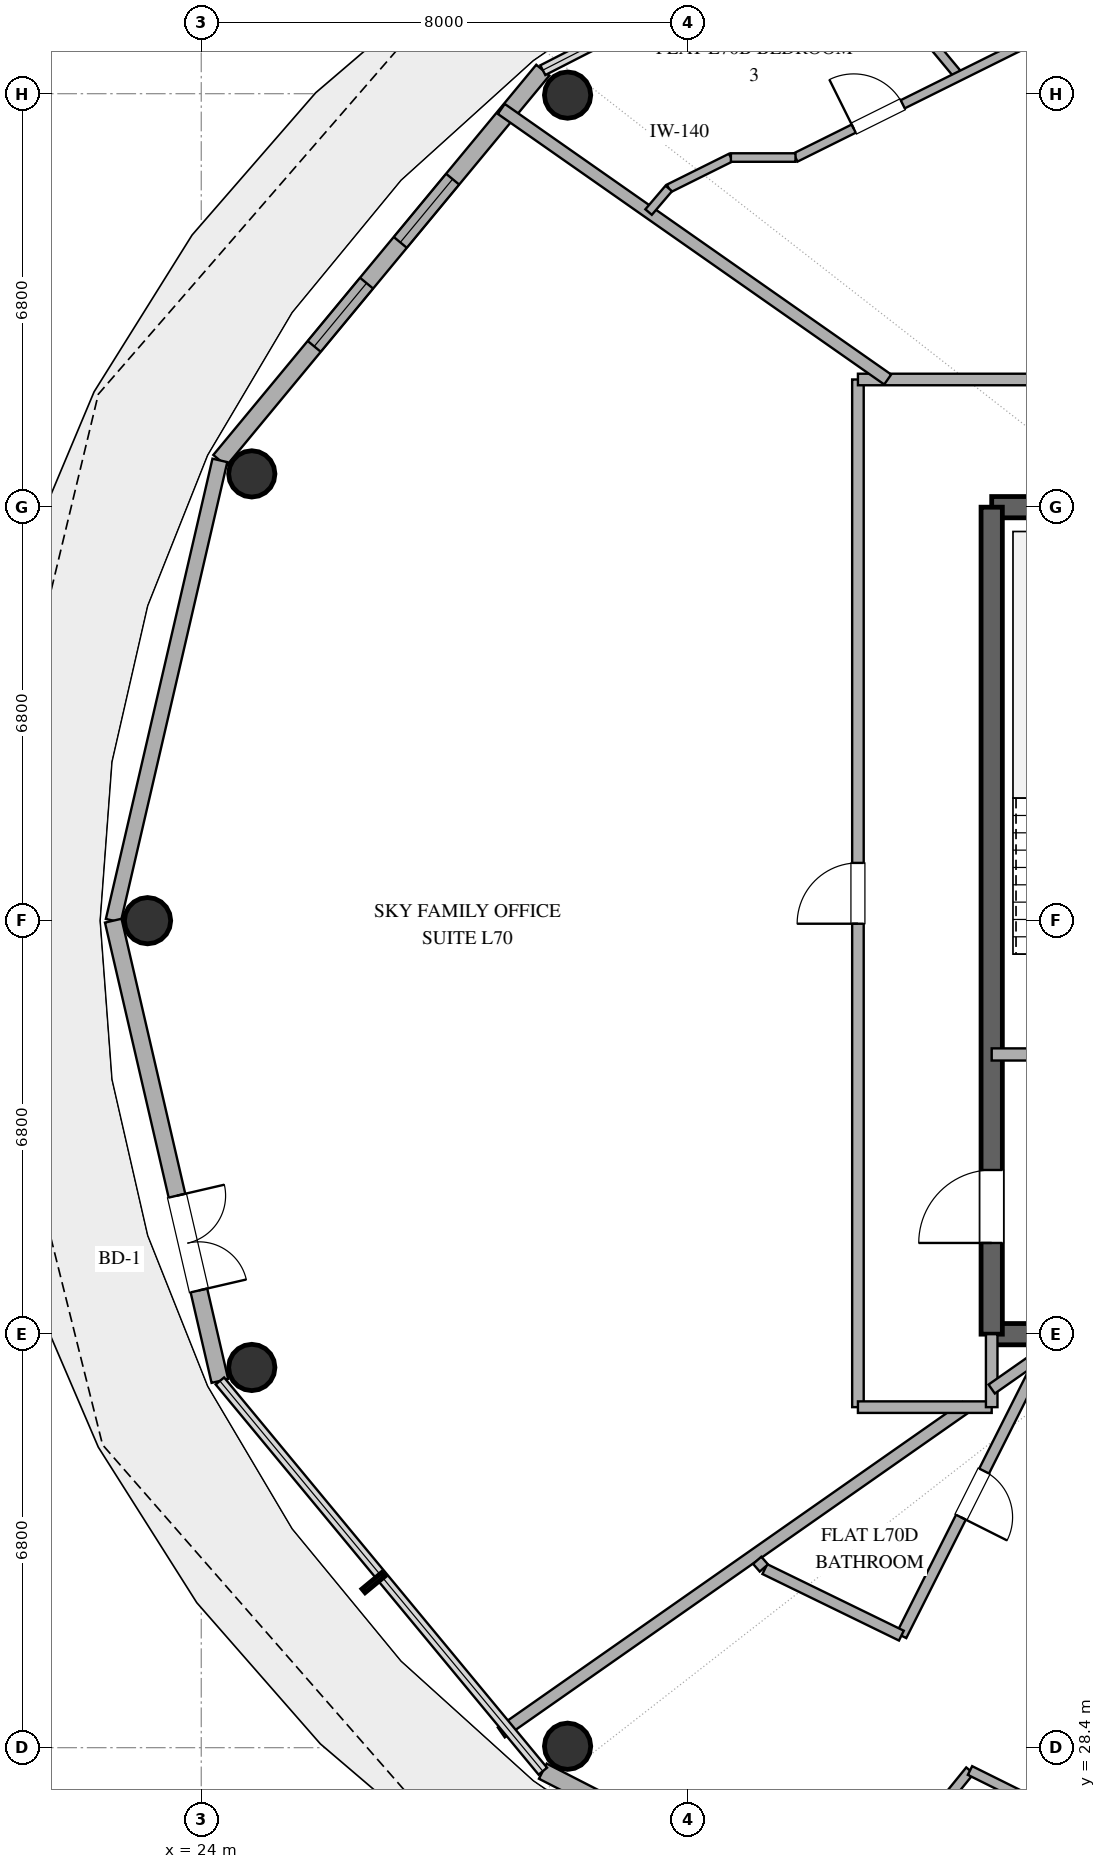
"""IFC4 building model, lengths in metres.
Left out: names, types, materials, properties, quantities, classifications, styles, units other than length and angle.
Written with IfcOpenShell. Run it as: python <this file> out.ifc"""

import sys

from ifc_helpers import new_model, si_unit, direction, frame, frame_2d, origin, origin_2d, place, context, subcontext, project, spatial, rectangle, hollow_circle, extrude, element, fill, save


model = new_model("IFC4")
c1 = context("Model", 3, precision=1e-05, world=origin(), true_north=direction((0.0, 1.0)))
c2 = subcontext(c1, "Body", "Model", "MODEL_VIEW")
j1 = project(units=[si_unit("LENGTHUNIT", "METRE"), si_unit("PLANEANGLEUNIT", "RADIAN")], contexts=[c1])
p1 = place(None, origin())
s1 = spatial("IfcSite", under=j1, at=p1, CompositionType="ELEMENT")
p2 = place(p1, origin())
s2 = spatial("IfcBuilding", under=s1, at=p2, CompositionType="ELEMENT")
p3 = place(p2, frame((0.0, 0.0, 273.0)))
s3 = spatial("IfcBuildingStorey", under=s2, at=p3, CompositionType="ELEMENT", Elevation=273.0)
for number, where, z_axis, x_axis in (
    (1, (37.0, 35.2, 0.0), (0.0, 0.0, 1.0), (1.0, 0.0, 0.0)),
    (2, (37.0, 48.8, 0.0), (0.0, 0.0, 1.0), (1.0, 0.0, 0.0)),
):
    element("IfcWall", number, at=place(p3, frame(where, z_axis=z_axis, x_axis=x_axis)), inside=s3, PredefinedType="SHEAR", context=c2, shape_type="SweptSolid", body=[
        extrude(rectangle(XDim=4.0, YDim=0.35, at=frame_2d((2.0, 0.0))), origin(), (0.0, 0.0, 1.0), 3.37),
    ])
p4 = place(p3, frame((37.0, 35.2, 0.0), z_axis=(0.0, 0.0, 1.0), x_axis=(0.0, 1.0, 0.0)))
e3 = element("IfcWall", 3, at=p4, inside=s3, PredefinedType="SHEAR", context=c2, shape_type="SweptSolid", body=[
    extrude(rectangle(XDim=13.6, YDim=0.35, at=frame_2d((6.8, 0.0))), origin(), (0.0, 0.0, 1.0), 3.37),
])
p5 = place(p4, frame((1.5, 0.0, 0.0)))
e4 = element("IfcOpeningElement", 4, at=p5, cuts=e3, PredefinedType="OPENING", context=c2, shape_type="SweptSolid", body=[
    extrude(rectangle(XDim=1.2, YDim=2.15, at=frame_2d((0.6, 1.075))), frame((0.0, 0.185, 0.0), z_axis=(0.0, -1.0, 0.0), x_axis=(1.0, 0.0, 0.0)), (0.0, 0.0, 1.0), 0.37),
])
for number, where, z_axis, x_axis in (
    (5, (30.025, 55.576, 0.0), (0.0, 0.0, 1.0), (1.0, 0.0, 0.0)),
    (6, (24.831, 49.347, 0.0), (0.0, 0.0, 1.0), (1.0, 0.0, 0.0)),
    (7, (23.117, 42.0, 0.0), (0.0, 0.0, 1.0), (1.0, 0.0, 0.0)),
    (8, (24.831, 34.653, 0.0), (0.0, 0.0, 1.0), (1.0, 0.0, 0.0)),
    (9, (30.025, 28.424, 0.0), (0.0, 0.0, 1.0), (1.0, 0.0, 0.0)),
):
    element("IfcColumn", number, at=place(p3, frame(where, z_axis=z_axis, x_axis=x_axis)), inside=s3, PredefinedType="COLUMN", context=c2, shape_type="SweptSolid", body=[
        extrude(hollow_circle(Radius=0.381, WallThickness=0.025, at=origin_2d()), origin(), (0.0, 0.0, 1.0), 3.37),
    ])
p6 = place(p3, frame((29.617, 55.987, 0.0), z_axis=(0.0, 0.0, 1.0), x_axis=(-0.63761509934, -0.770355103243, 0.0)))
e10 = element("IfcWall", 10, at=p6, inside=s3, PredefinedType="SOLIDWALL", context=c2, shape_type="SweptSolid", body=[
    extrude(rectangle(XDim=8.33, YDim=0.28, at=frame_2d((4.165, 0.0))), origin(), (0.0, 0.0, 1.0), 3.37),
])
p7 = place(p6, frame((2.326, 0.0, 0.85)))
e11 = element("IfcOpeningElement", 11, at=p7, cuts=e10, PredefinedType="OPENING", context=c2, shape_type="SweptSolid", body=[
    extrude(rectangle(XDim=1.35, YDim=1.8, at=frame_2d((0.675, 0.9))), frame((0.0, 0.15, 0.0), z_axis=(0.0, -1.0, 0.0), x_axis=(1.0, 0.0, 0.0)), (0.0, 0.0, 1.0), 0.3),
])
p8 = place(p6, frame((4.546, 0.0, 0.85)))
e12 = element("IfcOpeningElement", 12, at=p8, cuts=e10, PredefinedType="OPENING", context=c2, shape_type="SweptSolid", body=[
    extrude(rectangle(XDim=1.35, YDim=1.8, at=frame_2d((0.675, 0.9))), frame((0.0, 0.15, 0.0), z_axis=(0.0, -1.0, 0.0), x_axis=(1.0, 0.0, 0.0)), (0.0, 0.0, 1.0), 0.3),
])
p9 = place(p3, frame((24.306, 49.57, 0.0), z_axis=(0.0, 0.0, 1.0), x_axis=(-0.225635078214, -0.974211892495, 0.0)))
e13 = element("IfcWall", 13, at=p9, inside=s3, PredefinedType="SOLIDWALL", context=c2, shape_type="SweptSolid", body=[
    extrude(rectangle(XDim=7.77, YDim=0.25, at=frame_2d((3.885, 0.0))), origin(), (0.0, 0.0, 1.0), 3.37),
])
p10 = place(p3, frame((22.553, 42.0, 0.0), z_axis=(0.0, 0.0, 1.0), x_axis=(0.225635078214, -0.974211892495, 0.0)))
e14 = element("IfcWall", 14, at=p10, inside=s3, PredefinedType="SOLIDWALL", context=c2, shape_type="SweptSolid", body=[
    extrude(rectangle(XDim=7.77, YDim=0.28, at=frame_2d((3.885, 0.0))), origin(), (0.0, 0.0, 1.0), 3.37),
])
p11 = place(p10, frame((4.642, 0.0, 0.0)))
e15 = element("IfcOpeningElement", 15, at=p11, cuts=e14, PredefinedType="OPENING", context=c2, shape_type="SweptSolid", body=[
    extrude(rectangle(XDim=1.6, YDim=2.25, at=frame_2d((0.8, 1.125))), frame((0.0, 0.15, 0.0), z_axis=(0.0, -1.0, 0.0), x_axis=(1.0, 0.0, 0.0)), (0.0, 0.0, 1.0), 0.3),
])
p12 = place(p3, frame((29.617, 28.013, 0.0), z_axis=(0.0, 0.0, 1.0), x_axis=(0.890007394051, -0.455946091699, 0.0)))
e16 = element("IfcWall", 16, at=p12, inside=s3, PredefinedType="SOLIDWALL", context=c2, shape_type="SweptSolid", body=[
    extrude(rectangle(XDim=9.404, YDim=0.28, at=frame_2d((4.702, 0.0))), origin(), (0.0, 0.0, 1.0), 3.37),
])
p13 = place(p12, frame((2.533, 0.0, 0.85)))
e17 = element("IfcOpeningElement", 17, at=p13, cuts=e16, PredefinedType="OPENING", context=c2, shape_type="SweptSolid", body=[
    extrude(rectangle(XDim=1.8, YDim=2.2, at=frame_2d((0.9, 1.1))), frame((0.0, 0.15, 0.0), z_axis=(0.0, -1.0, 0.0), x_axis=(1.0, 0.0, 0.0)), (0.0, 0.0, 1.0), 0.3),
])
p14 = place(p12, frame((6.049, 0.0, 0.85)))
e18 = element("IfcOpeningElement", 18, at=p14, cuts=e16, PredefinedType="OPENING", context=c2, shape_type="SweptSolid", body=[
    extrude(rectangle(XDim=1.65, YDim=2.0, at=frame_2d((0.825, 1.0))), frame((0.0, 0.15, 0.0), z_axis=(0.0, -1.0, 0.0), x_axis=(1.0, 0.0, 0.0)), (0.0, 0.0, 1.0), 0.3),
])
p15 = place(p3, frame((37.0, 39.8, 0.0), z_axis=(0.0, 0.0, 1.0), x_axis=(1.0, 0.0, 0.0)))
e19 = element("IfcWall", 19, at=p15, inside=s3, PredefinedType="SOLIDWALL", context=c2, shape_type="SweptSolid", body=[
    extrude(rectangle(XDim=4.0, YDim=0.2, at=frame_2d((2.0, 0.0))), origin(), (0.0, 0.0, 1.0), 2.73),
])
p16 = place(p15, frame((1.45, 0.0, 0.0)))
e20 = element("IfcOpeningElement", 20, at=p16, cuts=e19, PredefinedType="OPENING", context=c2, shape_type="SweptSolid", body=[
    extrude(rectangle(XDim=1.1, YDim=2.15, at=frame_2d((0.55, 1.075))), frame((0.0, 0.11, 0.0), z_axis=(0.0, -1.0, 0.0), x_axis=(1.0, 0.0, 0.0)), (0.0, 0.0, 1.0), 0.22),
])
p17 = place(p3, frame((34.8, 34.0, 0.0), z_axis=(0.0, 0.0, 1.0), x_axis=(0.0, 1.0, 0.0)))
e21 = element("IfcWall", 21, at=p17, inside=s3, PredefinedType="PARTITIONING", context=c2, shape_type="SweptSolid", body=[
    extrude(rectangle(XDim=16.9, YDim=0.19, at=frame_2d((8.45, 0.0))), origin(), (0.0, 0.0, 1.0), 2.73),
])
p18 = place(p17, frame((7.95, 0.0, 0.0)))
e22 = element("IfcOpeningElement", 22, at=p18, cuts=e21, PredefinedType="OPENING", context=c2, shape_type="SweptSolid", body=[
    extrude(rectangle(XDim=1.0, YDim=2.2, at=frame_2d((0.5, 1.1))), frame((0.0, 0.105, 0.0), z_axis=(0.0, -1.0, 0.0), x_axis=(1.0, 0.0, 0.0)), (0.0, 0.0, 1.0), 0.21),
])
p19 = place(p3, frame((34.8, 50.9, 0.0), z_axis=(0.0, 0.0, 1.0), x_axis=(1.0, 0.0, 0.0)))
e23 = element("IfcWall", 23, at=p19, inside=s3, PredefinedType="PARTITIONING", context=c2, shape_type="SweptSolid", body=[
    extrude(rectangle(XDim=15.618, YDim=0.19, at=frame_2d((7.809, 0.0))), origin(), (0.0, 0.0, 1.0), 2.73),
])
p20 = place(p19, frame((6.848, 0.0, 0.0)))
e24 = element("IfcOpeningElement", 24, at=p20, cuts=e23, PredefinedType="OPENING", context=c2, shape_type="SweptSolid", body=[
    extrude(rectangle(XDim=1.0, YDim=2.2, at=frame_2d((0.5, 1.1))), frame((0.0, 0.105, 0.0), z_axis=(0.0, -1.0, 0.0), x_axis=(1.0, 0.0, 0.0)), (0.0, 0.0, 1.0), 0.21),
])
p21 = place(p3, frame((37.855, 34.896, 0.0), z_axis=(0.0, 0.0, 1.0), x_axis=(-0.449274589412, -0.893393722447, 0.0)))
e25 = element("IfcWall", 25, at=p21, inside=s3, PredefinedType="PLUMBINGWALL", context=c2, shape_type="SweptSolid", body=[
    extrude(rectangle(XDim=5.209, YDim=0.18, at=frame_2d((2.604, 0.0))), origin(), (0.0, 0.0, 1.0), 2.73),
])
p22 = place(p21, frame((2.18, 0.0, 0.0)))
e26 = element("IfcOpeningElement", 26, at=p22, cuts=e25, PredefinedType="OPENING", context=c2, shape_type="SweptSolid", body=[
    extrude(rectangle(XDim=0.85, YDim=2.1, at=frame_2d((0.425, 1.05))), frame((0.0, 0.1, 0.0), z_axis=(0.0, -1.0, 0.0), x_axis=(1.0, 0.0, 0.0)), (0.0, 0.0, 1.0), 0.2),
])
p23 = place(p3, frame((36.575, 34.0, 0.0), z_axis=(0.0, 0.0, 1.0), x_axis=(-0.819138444565, -0.57359585828, 0.0)))
e27 = element("IfcWall", 27, at=p23, inside=s3, PredefinedType="PARTITIONING", context=c2, shape_type="SweptSolid", body=[
    extrude(rectangle(XDim=9.326, YDim=0.2, at=frame_2d((4.663, 0.0))), origin(), (0.0, 0.0, 1.0), 2.73),
])
p24 = place(p3, frame((35.29, 50.9, 0.0), z_axis=(0.0, 0.0, 1.0), x_axis=(-0.819162424527, 0.573561611549, 0.0)))
e28 = element("IfcWall", 28, at=p24, inside=s3, PredefinedType="PARTITIONING", context=c2, shape_type="SweptSolid", body=[
    extrude(rectangle(XDim=7.758, YDim=0.2, at=frame_2d((3.879, 0.0))), origin(), (0.0, 0.0, 1.0), 2.73),
])
p25 = place(p3, frame((36.465, 55.887, 0.0), z_axis=(0.0, 0.0, 1.0), x_axis=(-0.638979285107, 0.769223942168, 0.0)))
e29 = element("IfcWall", 29, at=p25, inside=s3, PredefinedType="PARTITIONING", context=c2, shape_type="SweptSolid", body=[
    extrude(rectangle(XDim=3.41, YDim=0.15, at=frame_2d((1.705, 0.0))), origin(), (0.0, 0.0, 1.0), 2.73),
])
p26 = place(p3, frame((36.643, 28.024, 0.0), z_axis=(0.0, 0.0, 1.0), x_axis=(-0.630641219738, -0.776074514442, 0.0)))
e30 = element("IfcWall", 30, at=p26, inside=s3, PredefinedType="PLUMBINGWALL", context=c2, shape_type="SweptSolid", body=[
    extrude(rectangle(XDim=3.405, YDim=0.16, at=frame_2d((1.702, 0.0))), origin(), (0.0, 0.0, 1.0), 2.73),
])
p27 = place(p26, frame((1.192, 0.0, 0.0)))
e31 = element("IfcOpeningElement", 31, at=p27, cuts=e30, PredefinedType="OPENING", context=c2, shape_type="SweptSolid", body=[
    extrude(rectangle(XDim=0.9, YDim=2.1, at=frame_2d((0.45, 1.05))), frame((0.0, 0.09, 0.0), z_axis=(0.0, -1.0, 0.0), x_axis=(1.0, 0.0, 0.0)), (0.0, 0.0, 1.0), 0.18),
])
p28 = place(p3, frame((33.773, 54.55, 0.0), z_axis=(0.0, 0.0, 1.0), x_axis=(0.895593510097, 0.44487331306, 0.0)))
e32 = element("IfcWall", 32, at=p28, inside=s3, PredefinedType="PARTITIONING", context=c2, shape_type="SweptSolid", body=[
    extrude(rectangle(XDim=6.222, YDim=0.15, at=frame_2d((3.111, 0.0))), origin(), (0.0, 0.0, 1.0), 2.73),
])
p29 = place(p28, frame((4.147, 0.0, 0.0)))
e33 = element("IfcOpeningElement", 33, at=p29, cuts=e32, PredefinedType="OPENING", context=c2, shape_type="SweptSolid", body=[
    extrude(rectangle(XDim=0.9, YDim=2.1, at=frame_2d((0.45, 1.05))), frame((0.0, 0.085, 0.0), z_axis=(0.0, -1.0, 0.0), x_axis=(1.0, 0.0, 0.0)), (0.0, 0.0, 1.0), 0.17),
])
p30 = place(p28, frame((1.069, 0.0, 0.0)))
e34 = element("IfcOpeningElement", 34, at=p30, cuts=e32, PredefinedType="OPENING", context=c2, shape_type="SweptSolid", body=[
    extrude(rectangle(XDim=0.9, YDim=2.1, at=frame_2d((0.45, 1.05))), frame((0.0, 0.085, 0.0), z_axis=(0.0, -1.0, 0.0), x_axis=(1.0, 0.0, 0.0)), (0.0, 0.0, 1.0), 0.17),
])
p31 = place(p3, frame((39.345, 26.682, 0.0), z_axis=(0.0, 0.0, 1.0), x_axis=(-0.895589359885, 0.44488166793, 0.0)))
e35 = element("IfcWall", 35, at=p31, inside=s3, PredefinedType="PLUMBINGWALL", context=c2, shape_type="SweptSolid", body=[
    extrude(rectangle(XDim=3.017, YDim=0.16, at=frame_2d((1.509, 0.0))), origin(), (0.0, 0.0, 1.0), 2.73),
])
p32 = place(p3, frame((35.514, 30.242, 0.0), z_axis=(0.0, 0.0, 1.0), x_axis=(-0.898915857852, 0.438121307975, 0.0)))
e36 = element("IfcWall", 36, at=p32, inside=s3, PredefinedType="PLUMBINGWALL", context=c2, shape_type="SweptSolid", body=[
    extrude(rectangle(XDim=2.498, YDim=0.18, at=frame_2d((1.249, 0.0))), origin(), (0.0, 0.0, 1.0), 2.73),
])
p33 = place(p3, frame((37.0, 34.0, 0.0), z_axis=(0.0, 0.0, 1.0), x_axis=(-1.0, 0.0, 0.0)))
e37 = element("IfcWall", 37, at=p33, inside=s3, PredefinedType="PARTITIONING", context=c2, shape_type="SweptSolid", body=[
    extrude(rectangle(XDim=2.2, YDim=0.19, at=frame_2d((1.1, 0.0))), origin(), (0.0, 0.0, 1.0), 2.73),
])
p34 = place(p3, frame((37.0, 35.2, 0.0), z_axis=(0.0, 0.0, 1.0), x_axis=(0.0, -1.0, 0.0)))
e38 = element("IfcWall", 38, at=p34, inside=s3, PredefinedType="PARTITIONING", context=c2, shape_type="SweptSolid", body=[
    extrude(rectangle(XDim=1.2, YDim=0.19, at=frame_2d((0.6, 0.0))), origin(), (0.0, 0.0, 1.0), 2.73),
])
p35 = place(p3, frame((31.689, 54.042, 0.0), z_axis=(0.0, 0.0, 1.0), x_axis=(0.895409226325, 0.445244109912, 0.0)))
e39 = element("IfcWall", 39, at=p35, inside=s3, PredefinedType="PARTITIONING", context=c2, shape_type="SweptSolid", body=[
    extrude(rectangle(XDim=1.141, YDim=0.14, at=frame_2d((0.571, 0.0))), origin(), (0.0, 0.0, 1.0), 2.73),
])
p36 = place(p3, frame((32.711, 54.55, 0.0), z_axis=(0.0, 0.0, 1.0), x_axis=(1.0, 0.0, 0.0)))
e40 = element("IfcWall", 40, at=p36, inside=s3, PredefinedType="PARTITIONING", context=c2, shape_type="SweptSolid", body=[
    extrude(rectangle(XDim=1.062, YDim=0.14, at=frame_2d((0.531, 0.0))), origin(), (0.0, 0.0, 1.0), 2.73),
])
p37 = place(p3, frame((37.0, 34.298, 0.0), z_axis=(0.0, 0.0, 1.0), x_axis=(0.81908900763, 0.573666451502, 0.0)))
e41 = element("IfcWall", 41, at=p37, inside=s3, PredefinedType="PLUMBINGWALL", context=c2, shape_type="SweptSolid", body=[
    extrude(rectangle(XDim=1.043, YDim=0.18, at=frame_2d((0.522, 0.0))), origin(), (0.0, 0.0, 1.0), 2.73),
])
p38 = place(p3, frame((31.357, 53.653, 0.0), z_axis=(0.0, 0.0, 1.0), x_axis=(0.648979151054, 0.76080619181, 0.0)))
e42 = element("IfcWall", 42, at=p38, inside=s3, PredefinedType="PARTITIONING", context=c2, shape_type="SweptSolid", body=[
    extrude(rectangle(XDim=0.511, YDim=0.14, at=frame_2d((0.255, 0.0))), origin(), (0.0, 0.0, 1.0), 2.73),
])
p39 = place(p3, frame((33.253, 31.355, 0.0), z_axis=(0.0, 0.0, 1.0), x_axis=(-0.656323784366, 0.754479350331, 0.0)))
e43 = element("IfcWall", 43, at=p39, inside=s3, PredefinedType="PLUMBINGWALL", context=c2, shape_type="SweptSolid", body=[
    extrude(rectangle(XDim=0.167, YDim=0.18, at=frame_2d((0.083, 0.0))), origin(), (0.0, 0.0, 1.0), 2.73),
])
p40 = place(p7, origin())
e44 = element("IfcWindow", 44, at=p40, inside=s3, PartitioningType="SINGLE_PANEL", PredefinedType="WINDOW", context=c2, shape_type="SweptSolid", body=[
    extrude(rectangle(XDim=1.35, YDim=1.8, at=frame_2d((0.675, 0.9))), frame((0.0, 0.03, 0.0), z_axis=(0.0, -1.0, 0.0), x_axis=(1.0, 0.0, 0.0)), (0.0, 0.0, 1.0), 0.06),
])
fill(e11, e44)
p41 = place(p8, origin())
e45 = element("IfcWindow", 45, at=p41, inside=s3, PartitioningType="SINGLE_PANEL", PredefinedType="WINDOW", context=c2, shape_type="SweptSolid", body=[
    extrude(rectangle(XDim=1.35, YDim=1.8, at=frame_2d((0.675, 0.9))), frame((0.0, 0.03, 0.0), z_axis=(0.0, -1.0, 0.0), x_axis=(1.0, 0.0, 0.0)), (0.0, 0.0, 1.0), 0.06),
])
fill(e12, e45)
p42 = place(p11, origin())
e46 = element("IfcDoor", 46, at=p42, inside=s3, OperationType="DOUBLE_DOOR_SINGLE_SWING", PredefinedType="DOOR", context=c2, shape_type="SweptSolid", body=[
    extrude(rectangle(XDim=1.6, YDim=2.25, at=frame_2d((0.8, 1.125))), frame((0.0, 0.025, 0.0), z_axis=(0.0, -1.0, 0.0), x_axis=(1.0, 0.0, 0.0)), (0.0, 0.0, 1.0), 0.05),
])
fill(e15, e46)
p43 = place(p5, origin())
e47 = element("IfcDoor", 47, at=p43, inside=s3, OperationType="SINGLE_SWING_LEFT", PredefinedType="DOOR", context=c2, shape_type="SweptSolid", body=[
    extrude(rectangle(XDim=1.2, YDim=2.15, at=frame_2d((0.6, 1.075))), frame((0.0, 0.025, 0.0), z_axis=(0.0, -1.0, 0.0), x_axis=(1.0, 0.0, 0.0)), (0.0, 0.0, 1.0), 0.05),
])
fill(e4, e47)
p44 = place(p18, origin())
e48 = element("IfcDoor", 48, at=p44, inside=s3, OperationType="SINGLE_SWING_LEFT", PredefinedType="DOOR", context=c2, shape_type="SweptSolid", body=[
    extrude(rectangle(XDim=1.0, YDim=2.2, at=frame_2d((0.5, 1.1))), frame((0.0, 0.025, 0.0), z_axis=(0.0, -1.0, 0.0), x_axis=(1.0, 0.0, 0.0)), (0.0, 0.0, 1.0), 0.05),
])
fill(e22, e48)
p45 = place(p22, origin())
e49 = element("IfcDoor", 49, at=p45, inside=s3, OperationType="SINGLE_SWING_RIGHT", PredefinedType="DOOR", context=c2, shape_type="SweptSolid", body=[
    extrude(rectangle(XDim=0.85, YDim=2.1, at=frame_2d((0.425, 1.05))), frame((0.0, 0.025, 0.0), z_axis=(0.0, -1.0, 0.0), x_axis=(1.0, 0.0, 0.0)), (0.0, 0.0, 1.0), 0.05),
])
fill(e26, e49)
p46 = place(p30, origin())
e50 = element("IfcDoor", 50, at=p46, inside=s3, OperationType="SINGLE_SWING_LEFT", PredefinedType="DOOR", context=c2, shape_type="SweptSolid", body=[
    extrude(rectangle(XDim=0.9, YDim=2.1, at=frame_2d((0.45, 1.05))), frame((0.0, 0.025, 0.0), z_axis=(0.0, -1.0, 0.0), x_axis=(1.0, 0.0, 0.0)), (0.0, 0.0, 1.0), 0.05),
])
fill(e34, e50)
save(model, sys.argv[1])
